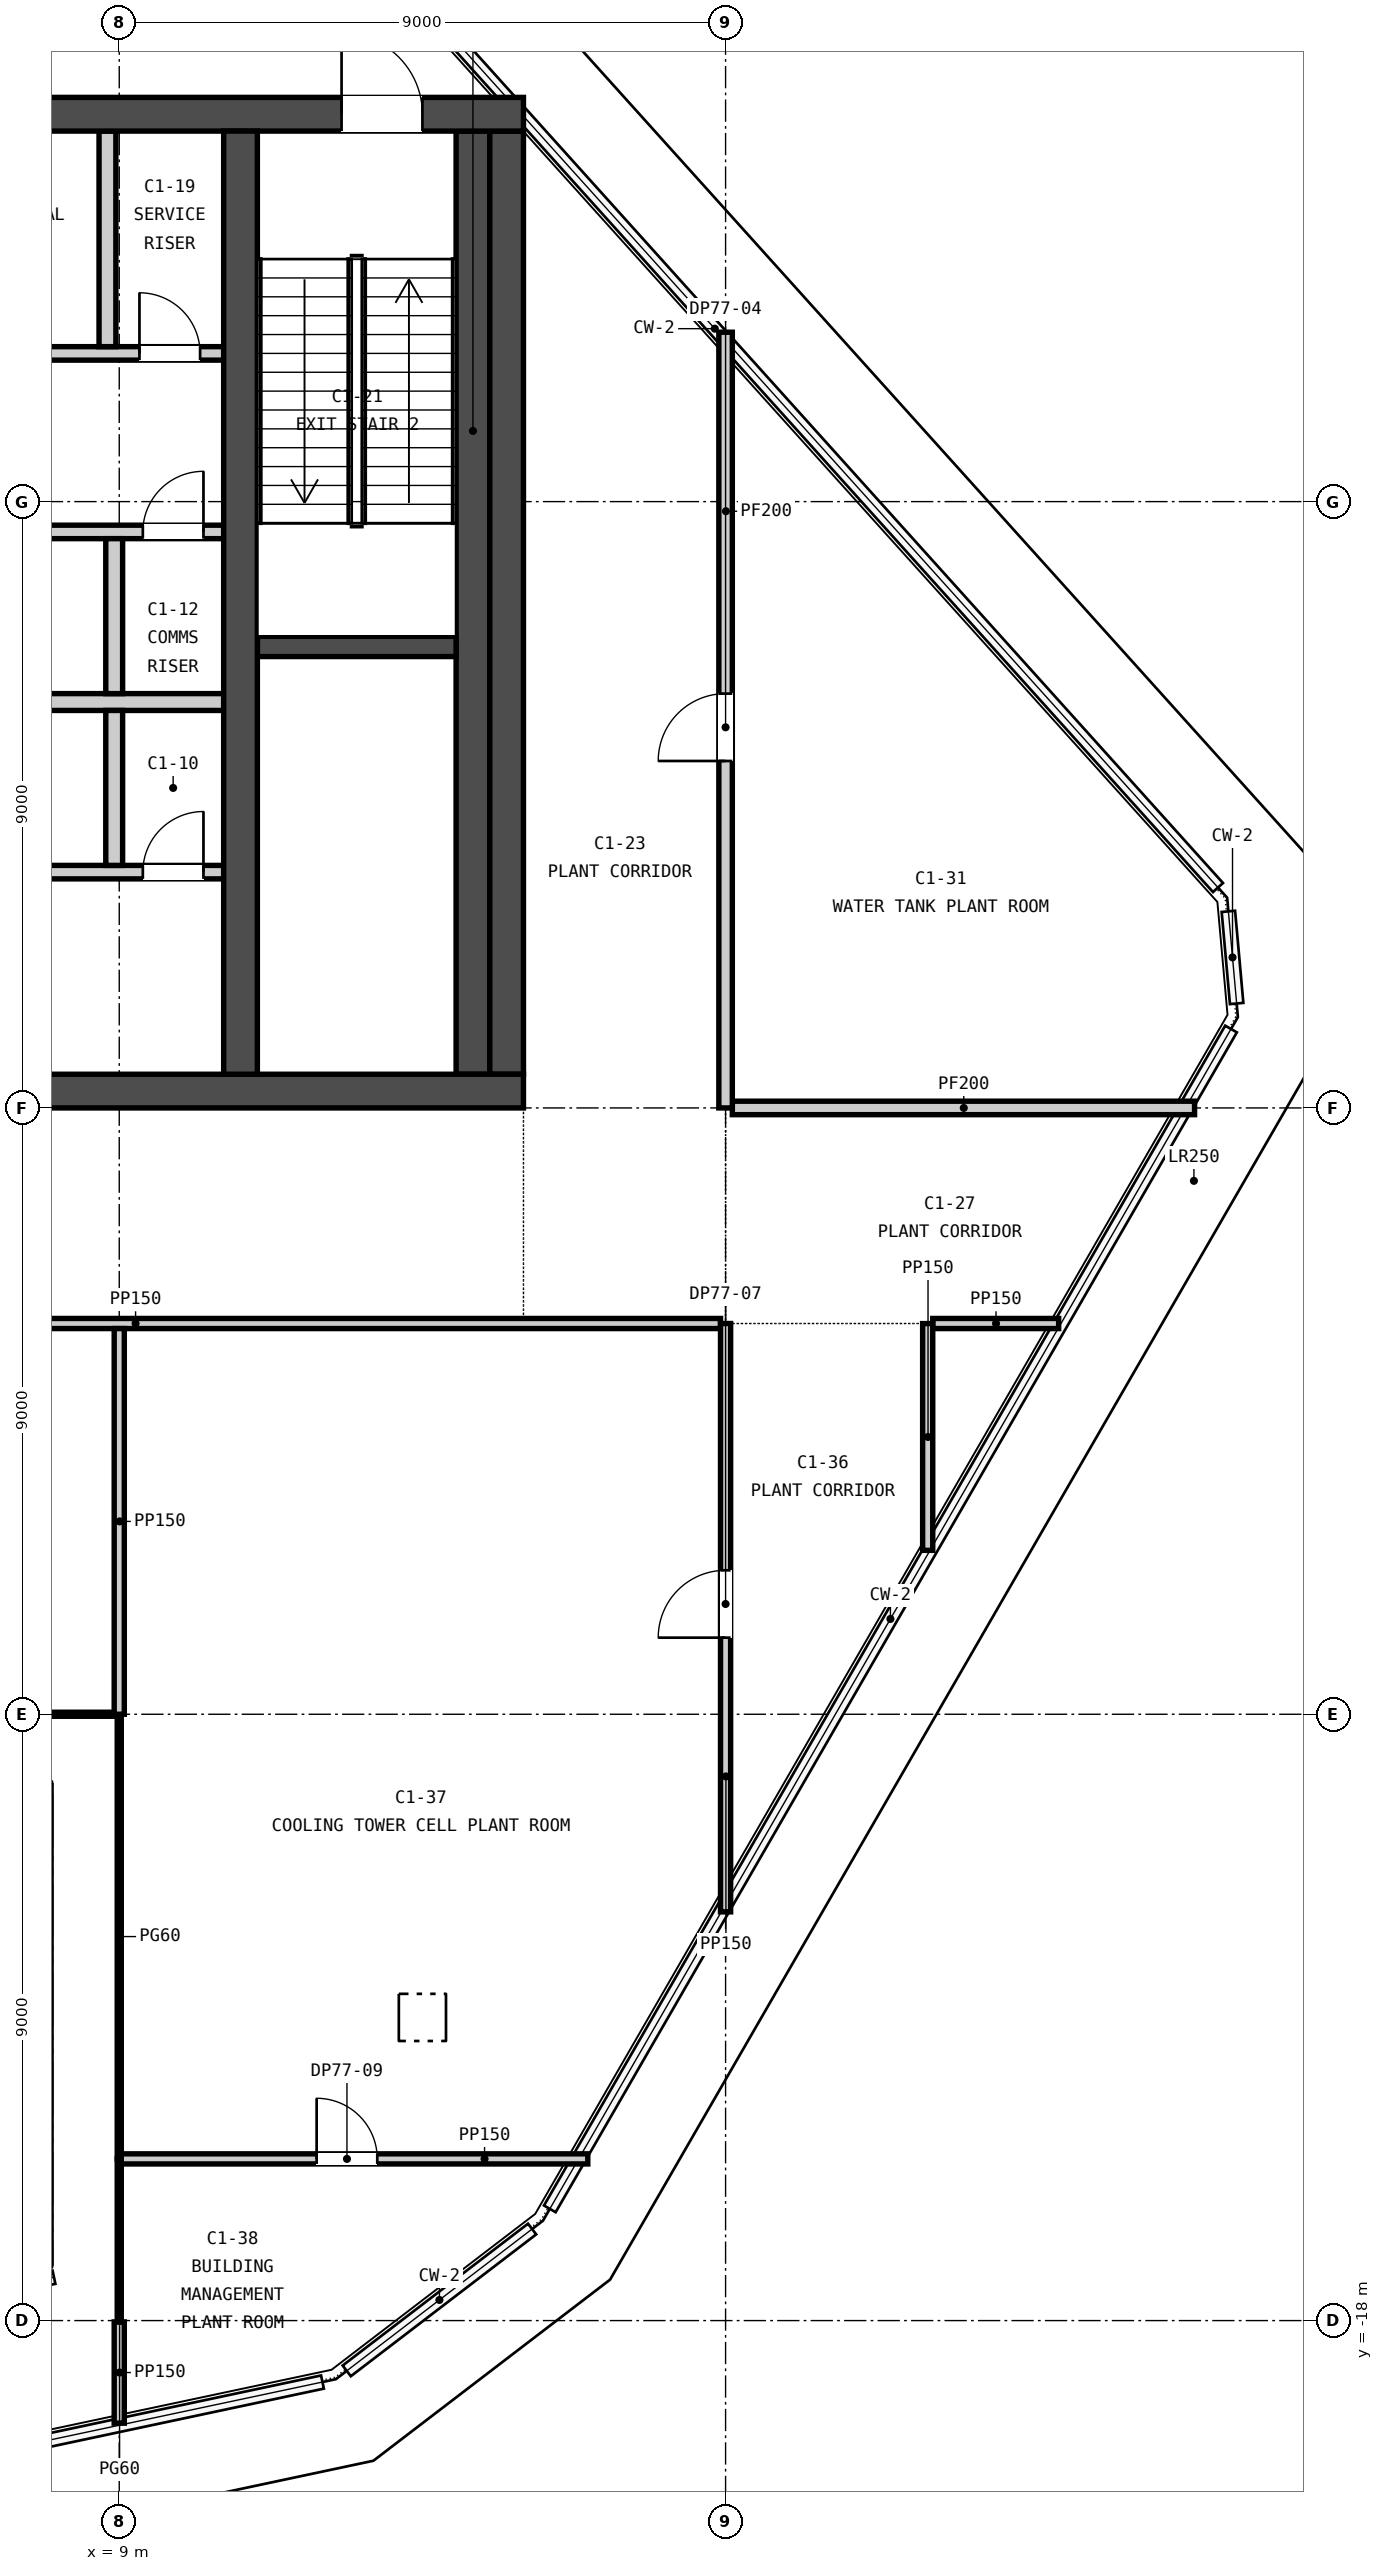
"""IFC4 building model, lengths in metres.
Left out: names, types, materials, properties, quantities, classifications, styles, units other than length and angle.
Written with IfcOpenShell. Run it as: python <this file> out.ifc"""

import sys

from ifc_helpers import new_model, si_unit, direction, frame, frame_2d, origin, place, context, subcontext, project, spatial, rectangle, extrude, element, fill, save


model = new_model("IFC4")
c1 = context("Model", 3, precision=1e-05, world=origin(), true_north=direction((0.0, 1.0)))
c2 = subcontext(c1, "Body", "Model", "MODEL_VIEW")
j1 = project(units=[si_unit("LENGTHUNIT", "METRE"), si_unit("PLANEANGLEUNIT", "RADIAN")], contexts=[c1])
p1 = place(None, origin())
s1 = spatial("IfcSite", under=j1, at=p1, CompositionType="ELEMENT")
p2 = place(p1, origin())
s2 = spatial("IfcBuilding", under=s1, at=p2, CompositionType="ELEMENT")
p3 = place(p2, frame((0.0, 0.0, 301.1)))
s3 = spatial("IfcBuildingStorey", under=s2, at=p3, CompositionType="ELEMENT", Elevation=301.1)
p4 = place(p3, frame((-15.0, 0.25, -0.25), z_axis=(0.0, 0.0, 1.0), x_axis=(1.0, 0.0, 0.0)))
e1 = element("IfcWall", 1, at=p4, inside=s3, PredefinedType="SOLIDWALL", context=c2, shape_type="SweptSolid", body=[
    extrude(rectangle(XDim=30.0, YDim=0.5, at=frame_2d((15.0, 0.0))), origin(), (0.0, 0.0, 1.0), 5.0),
])
p5 = place(p3, frame((-15.0, 14.75, -0.25), z_axis=(0.0, 0.0, 1.0), x_axis=(1.0, 0.0, 0.0)))
e2 = element("IfcWall", 2, at=p5, inside=s3, PredefinedType="SOLIDWALL", context=c2, shape_type="SweptSolid", body=[
    extrude(rectangle(XDim=30.0, YDim=0.5, at=frame_2d((15.0, 0.0))), origin(), (0.0, 0.0, 1.0), 5.0),
])
p6 = place(p5, frame((9.25, 0.0, 0.25)))
e3 = element("IfcOpeningElement", 3, at=p6, cuts=e2, PredefinedType="OPENING", context=c2, shape_type="SweptSolid", body=[
    extrude(rectangle(XDim=1.5, YDim=2.1, at=frame_2d((0.75, 1.05))), frame((0.0, 0.26, 0.0), z_axis=(0.0, -1.0, 0.0), x_axis=(1.0, 0.0, 0.0)), (0.0, 0.0, 1.0), 0.52),
])
p7 = place(p5, frame((19.4, 0.0, 0.25)))
e4 = element("IfcOpeningElement", 4, at=p7, cuts=e2, PredefinedType="OPENING", context=c2, shape_type="SweptSolid", body=[
    extrude(rectangle(XDim=1.5, YDim=2.1, at=frame_2d((0.75, 1.05))), frame((0.0, 0.26, 0.0), z_axis=(0.0, -1.0, 0.0), x_axis=(1.0, 0.0, 0.0)), (0.0, 0.0, 1.0), 0.52),
])
p8 = place(p5, frame((1.5, 0.0, 0.25)))
e5 = element("IfcOpeningElement", 5, at=p8, cuts=e2, PredefinedType="OPENING", context=c2, shape_type="SweptSolid", body=[
    extrude(rectangle(XDim=1.2, YDim=2.1, at=frame_2d((0.6, 1.05))), frame((0.0, 0.26, 0.0), z_axis=(0.0, -1.0, 0.0), x_axis=(1.0, 0.0, 0.0)), (0.0, 0.0, 1.0), 0.52),
])
p9 = place(p5, frame((27.3, 0.0, 0.25)))
e6 = element("IfcOpeningElement", 6, at=p9, cuts=e2, PredefinedType="OPENING", context=c2, shape_type="SweptSolid", body=[
    extrude(rectangle(XDim=1.2, YDim=2.1, at=frame_2d((0.6, 1.05))), frame((0.0, 0.26, 0.0), z_axis=(0.0, -1.0, 0.0), x_axis=(1.0, 0.0, 0.0)), (0.0, 0.0, 1.0), 0.52),
])
for number, where, z_axis, x_axis in (
    (7, (14.75, 0.5, -0.25), (0.0, 0.0, 1.0), (0.0, 1.0, 0.0)),
    (8, (10.8, 0.5, -0.25), (0.0, 0.0, 1.0), (0.0, 1.0, 0.0)),
):
    element("IfcWall", number, at=place(p3, frame(where, z_axis=z_axis, x_axis=x_axis)), inside=s3, PredefinedType="SOLIDWALL", context=c2, shape_type="SweptSolid", body=[
        extrude(rectangle(XDim=14.0, YDim=0.5, at=frame_2d((7.0, 0.0))), origin(), (0.0, 0.0, 1.0), 5.0),
    ])
p10 = place(p3, frame((-10.55, 3.5, 0.0), z_axis=(0.0, 0.0, 1.0), x_axis=(1.0, 0.0, 0.0)))
e9 = element("IfcWall", 9, at=p10, inside=s3, PredefinedType="PARTITIONING", context=c2, shape_type="SweptSolid", body=[
    extrude(rectangle(XDim=21.1, YDim=0.2, at=frame_2d((10.55, 0.0))), origin(), (0.0, 0.0, 1.0), 4.75),
])
p11 = place(p10, frame((19.9, 0.0, 0.0)))
e10 = element("IfcOpeningElement", 10, at=p11, cuts=e9, PredefinedType="OPENING", context=c2, shape_type="SweptSolid", body=[
    extrude(rectangle(XDim=0.9, YDim=2.1, at=frame_2d((0.45, 1.05))), frame((0.0, 0.11, 0.0), z_axis=(0.0, -1.0, 0.0), x_axis=(1.0, 0.0, 0.0)), (0.0, 0.0, 1.0), 0.22),
])
p12 = place(p3, frame((-10.55, 6.025, 0.0), z_axis=(0.0, 0.0, 1.0), x_axis=(1.0, 0.0, 0.0)))
e11 = element("IfcWall", 11, at=p12, inside=s3, PredefinedType="PARTITIONING", context=c2, shape_type="SweptSolid", body=[
    extrude(rectangle(XDim=21.1, YDim=0.25, at=frame_2d((10.55, 0.0))), origin(), (0.0, 0.0, 1.0), 4.75),
])
p13 = place(p3, frame((-4.125, 8.55, 0.0), z_axis=(0.0, 0.0, 1.0), x_axis=(1.0, 0.0, 0.0)))
e12 = element("IfcWall", 12, at=p13, inside=s3, PredefinedType="PARTITIONING", context=c2, shape_type="SweptSolid", body=[
    extrude(rectangle(XDim=14.675, YDim=0.2, at=frame_2d((7.337, 0.0))), origin(), (0.0, 0.0, 1.0), 4.75),
])
p14 = place(p13, frame((3.525, 0.0, 0.0)))
e13 = element("IfcOpeningElement", 13, at=p14, cuts=e12, PredefinedType="OPENING", context=c2, shape_type="SweptSolid", body=[
    extrude(rectangle(XDim=1.2, YDim=2.1, at=frame_2d((0.6, 1.05))), frame((0.0, 0.11, 0.0), z_axis=(0.0, -1.0, 0.0), x_axis=(1.0, 0.0, 0.0)), (0.0, 0.0, 1.0), 0.22),
])
p15 = place(p13, frame((13.475, 0.0, 0.0)))
e14 = element("IfcOpeningElement", 14, at=p15, cuts=e12, PredefinedType="OPENING", context=c2, shape_type="SweptSolid", body=[
    extrude(rectangle(XDim=0.9, YDim=2.1, at=frame_2d((0.45, 1.05))), frame((0.0, 0.11, 0.0), z_axis=(0.0, -1.0, 0.0), x_axis=(1.0, 0.0, 0.0)), (0.0, 0.0, 1.0), 0.22),
])
p16 = place(p3, frame((5.9, 11.2, 0.0), z_axis=(0.0, 0.0, 1.0), x_axis=(1.0, 0.0, 0.0)))
e15 = element("IfcWall", 15, at=p16, inside=s3, PredefinedType="PARTITIONING", context=c2, shape_type="SweptSolid", body=[
    extrude(rectangle(XDim=4.65, YDim=0.2, at=frame_2d((2.325, 0.0))), origin(), (0.0, 0.0, 1.0), 4.75),
])
p17 = place(p16, frame((1.075, 0.0, 0.0)))
e16 = element("IfcOpeningElement", 16, at=p17, cuts=e15, PredefinedType="OPENING", context=c2, shape_type="SweptSolid", body=[
    extrude(rectangle(XDim=0.9, YDim=2.1, at=frame_2d((0.45, 1.05))), frame((0.0, 0.11, 0.0), z_axis=(0.0, -1.0, 0.0), x_axis=(1.0, 0.0, 0.0)), (0.0, 0.0, 1.0), 0.22),
])
p18 = place(p16, frame((3.4, 0.0, 0.0)))
e17 = element("IfcOpeningElement", 17, at=p18, cuts=e15, PredefinedType="OPENING", context=c2, shape_type="SweptSolid", body=[
    extrude(rectangle(XDim=0.9, YDim=2.1, at=frame_2d((0.45, 1.05))), frame((0.0, 0.11, 0.0), z_axis=(0.0, -1.0, 0.0), x_axis=(1.0, 0.0, 0.0)), (0.0, 0.0, 1.0), 0.22),
])
p19 = place(p3, frame((8.925, 3.6, 0.0), z_axis=(0.0, 0.0, 1.0), x_axis=(0.0, 1.0, 0.0)))
e18 = element("IfcWall", 18, at=p19, inside=s3, PredefinedType="PARTITIONING", context=c2, shape_type="SweptSolid", body=[
    extrude(rectangle(XDim=2.3, YDim=0.25, at=frame_2d((1.15, 0.0))), origin(), (0.0, 0.0, 1.0), 4.75),
])
p20 = place(p3, frame((8.925, 6.15, 0.0), z_axis=(0.0, 0.0, 1.0), x_axis=(0.0, 1.0, 0.0)))
e19 = element("IfcWall", 19, at=p20, inside=s3, PredefinedType="PARTITIONING", context=c2, shape_type="SweptSolid", body=[
    extrude(rectangle(XDim=2.3, YDim=0.25, at=frame_2d((1.15, 0.0))), origin(), (0.0, 0.0, 1.0), 4.75),
])
p21 = place(p3, frame((8.825, 11.3, 0.0), z_axis=(0.0, 0.0, 1.0), x_axis=(0.0, 1.0, 0.0)))
e20 = element("IfcWall", 20, at=p21, inside=s3, PredefinedType="PARTITIONING", context=c2, shape_type="SweptSolid", body=[
    extrude(rectangle(XDim=3.2, YDim=0.25, at=frame_2d((1.6, 0.0))), origin(), (0.0, 0.0, 1.0), 4.75),
])
p22 = place(p3, frame((11.05, 6.85, 0.0), z_axis=(0.0, 0.0, 1.0), x_axis=(1.0, 0.0, 0.0)))
e21 = element("IfcWall", 21, at=p22, inside=s3, PredefinedType="SOLIDWALL", context=c2, shape_type="SweptSolid", body=[
    extrude(rectangle(XDim=2.95, YDim=0.3, at=frame_2d((1.475, 0.0))), origin(), (0.0, 0.0, 1.0), 4.75),
])
p23 = place(p3, frame((14.25, 0.5, 0.0), z_axis=(0.0, 0.0, 1.0), x_axis=(0.0, 1.0, 0.0)))
e22 = element("IfcWall", 22, at=p23, inside=s3, PredefinedType="SOLIDWALL", context=c2, shape_type="SweptSolid", body=[
    extrude(rectangle(XDim=14.0, YDim=0.5, at=frame_2d((7.0, 0.0))), origin(), (0.0, 0.0, 1.0), 4.75),
])
p24 = place(p3, frame((9.03, -15.6, 0.0), z_axis=(0.0, 0.0, 1.0), x_axis=(1.0, 0.0, 0.0)))
e23 = element("IfcWall", 23, at=p24, inside=s3, PredefinedType="PARTITIONING", context=c2, shape_type="SweptSolid", body=[
    extrude(rectangle(XDim=6.925, YDim=0.15, at=frame_2d((3.462, 0.0))), origin(), (0.0, 0.0, 1.0), 4.75),
])
p25 = place(p24, frame((2.9, 0.0, 0.0)))
e24 = element("IfcOpeningElement", 24, at=p25, cuts=e23, PredefinedType="OPENING", context=c2, shape_type="SweptSolid", body=[
    extrude(rectangle(XDim=0.9, YDim=2.1, at=frame_2d((0.45, 1.05))), frame((0.0, 0.085, 0.0), z_axis=(0.0, -1.0, 0.0), x_axis=(1.0, 0.0, 0.0)), (0.0, 0.0, 1.0), 0.17),
])
p26 = place(p3, frame((-8.9, -9.0, 0.0), z_axis=(0.0, 0.0, 1.0), x_axis=(1.0, 0.0, 0.0)))
e25 = element("IfcWall", 25, at=p26, inside=s3, PredefinedType="PARTITIONING", context=c2, shape_type="SweptSolid", body=[
    extrude(rectangle(XDim=17.825, YDim=0.06, at=frame_2d((8.913, 0.0))), origin(), (0.0, 0.0, 1.0), 4.75),
])
p27 = place(p3, frame((-8.9, -3.2, 0.0), z_axis=(0.0, 0.0, 1.0), x_axis=(1.0, 0.0, 0.0)))
e26 = element("IfcWall", 26, at=p27, inside=s3, PredefinedType="PARTITIONING", context=c2, shape_type="SweptSolid", body=[
    extrude(rectangle(XDim=26.825, YDim=0.15, at=frame_2d((13.413, 0.0))), origin(), (0.0, 0.0, 1.0), 4.75),
])
p28 = place(p27, frame((8.4, 0.0, 0.0)))
e27 = element("IfcOpeningElement", 27, at=p28, cuts=e26, PredefinedType="OPENING", context=c2, shape_type="SweptSolid", body=[
    extrude(rectangle(XDim=1.0, YDim=2.1, at=frame_2d((0.5, 1.05))), frame((0.0, 0.085, 0.0), z_axis=(0.0, -1.0, 0.0), x_axis=(1.0, 0.0, 0.0)), (0.0, 0.0, 1.0), 0.17),
])
p29 = place(p3, frame((21.075, -3.2, 0.0), z_axis=(0.0, 0.0, 1.0), x_axis=(1.0, 0.0, 0.0)))
e28 = element("IfcWall", 28, at=p29, inside=s3, PredefinedType="PARTITIONING", context=c2, shape_type="SweptSolid", body=[
    extrude(rectangle(XDim=1.869, YDim=0.15, at=frame_2d((0.935, 0.0))), origin(), (0.0, 0.0, 1.0), 4.75),
])
p30 = place(p3, frame((18.1, 0.0, 0.0), z_axis=(0.0, 0.0, 1.0), x_axis=(1.0, 0.0, 0.0)))
e29 = element("IfcWall", 29, at=p30, inside=s3, PredefinedType="PARTITIONING", context=c2, shape_type="SweptSolid", body=[
    extrude(rectangle(XDim=6.861, YDim=0.2, at=frame_2d((3.431, 0.0))), origin(), (0.0, 0.0, 1.0), 4.75),
])
p31 = place(p3, frame((9.0, -19.523, 0.0), z_axis=(0.0, 0.0, 1.0), x_axis=(0.0, 1.0, 0.0)))
e30 = element("IfcWall", 30, at=p31, inside=s3, PredefinedType="PARTITIONING", context=c2, shape_type="SweptSolid", body=[
    extrude(rectangle(XDim=1.503, YDim=0.15, at=frame_2d((0.751, 0.0))), origin(), (0.0, 0.0, 1.0), 4.75),
])
p32 = place(p3, frame((9.0, -18.02, 0.0), z_axis=(0.0, 0.0, 1.0), x_axis=(0.0, 1.0, 0.0)))
e31 = element("IfcWall", 31, at=p32, inside=s3, PredefinedType="PARTITIONING", context=c2, shape_type="SweptSolid", body=[
    extrude(rectangle(XDim=2.419, YDim=0.06, at=frame_2d((1.209, 0.0))), origin(), (0.0, 0.0, 1.0), 4.75),
])
p33 = place(p3, frame((9.0, -15.599, 0.0), z_axis=(0.0, 0.0, 1.0), x_axis=(0.0, 1.0, 0.0)))
e32 = element("IfcWall", 32, at=p33, inside=s3, PredefinedType="PARTITIONING", context=c2, shape_type="SweptSolid", body=[
    extrude(rectangle(XDim=6.598, YDim=0.06, at=frame_2d((3.299, 0.0))), origin(), (0.0, 0.0, 1.0), 4.75),
])
p34 = place(p3, frame((9.0, -9.0, 0.0), z_axis=(0.0, 0.0, 1.0), x_axis=(0.0, 1.0, 0.0)))
e33 = element("IfcWall", 33, at=p34, inside=s3, PredefinedType="PARTITIONING", context=c2, shape_type="SweptSolid", body=[
    extrude(rectangle(XDim=5.725, YDim=0.15, at=frame_2d((2.863, 0.0))), origin(), (0.0, 0.0, 1.0), 4.75),
])
p35 = place(p3, frame((18.0, -11.933, 0.0), z_axis=(0.0, 0.0, 1.0), x_axis=(0.0, 1.0, 0.0)))
e34 = element("IfcWall", 34, at=p35, inside=s3, PredefinedType="PARTITIONING", context=c2, shape_type="SweptSolid", body=[
    extrude(rectangle(XDim=8.733, YDim=0.15, at=frame_2d((4.367, 0.0))), origin(), (0.0, 0.0, 1.0), 4.75),
])
p36 = place(p35, frame((4.07, 0.0, 0.0)))
e35 = element("IfcOpeningElement", 35, at=p36, cuts=e34, PredefinedType="OPENING", context=c2, shape_type="SweptSolid", body=[
    extrude(rectangle(XDim=1.0, YDim=2.1, at=frame_2d((0.5, 1.05))), frame((0.0, 0.085, 0.0), z_axis=(0.0, -1.0, 0.0), x_axis=(1.0, 0.0, 0.0)), (0.0, 0.0, 1.0), 0.17),
])
p37 = place(p3, frame((18.0, 0.0, 0.0), z_axis=(0.0, 0.0, 1.0), x_axis=(0.0, 1.0, 0.0)))
e36 = element("IfcWall", 36, at=p37, inside=s3, PredefinedType="PARTITIONING", context=c2, shape_type="SweptSolid", body=[
    extrude(rectangle(XDim=11.514, YDim=0.2, at=frame_2d((5.757, 0.0))), origin(), (0.0, 0.0, 1.0), 4.75),
])
p38 = place(p37, frame((5.15, 0.0, 0.0)))
e37 = element("IfcOpeningElement", 37, at=p38, cuts=e36, PredefinedType="OPENING", context=c2, shape_type="SweptSolid", body=[
    extrude(rectangle(XDim=1.0, YDim=2.1, at=frame_2d((0.5, 1.05))), frame((0.0, 0.11, 0.0), z_axis=(0.0, -1.0, 0.0), x_axis=(1.0, 0.0, 0.0)), (0.0, 0.0, 1.0), 0.22),
])
p39 = place(p3, frame((21.0, -6.567, 0.0), z_axis=(0.0, 0.0, 1.0), x_axis=(0.0, 1.0, 0.0)))
e38 = element("IfcWall", 38, at=p39, inside=s3, PredefinedType="PARTITIONING", context=c2, shape_type="SweptSolid", body=[
    extrude(rectangle(XDim=3.366, YDim=0.15, at=frame_2d((1.683, 0.0))), origin(), (0.0, 0.0, 1.0), 4.75),
])
p40 = place(p11, origin())
e39 = element("IfcDoor", 39, at=p40, inside=s3, OperationType="SINGLE_SWING_RIGHT", PredefinedType="DOOR", context=c2, shape_type="SweptSolid", body=[
    extrude(rectangle(XDim=0.9, YDim=2.1, at=frame_2d((0.45, 1.05))), frame((0.0, 0.025, 0.0), z_axis=(0.0, -1.0, 0.0), x_axis=(1.0, 0.0, 0.0)), (0.0, 0.0, 1.0), 0.05),
])
fill(e10, e39)
p41 = place(p15, origin())
e40 = element("IfcDoor", 40, at=p41, inside=s3, OperationType="SINGLE_SWING_RIGHT", PredefinedType="DOOR", context=c2, shape_type="SweptSolid", body=[
    extrude(rectangle(XDim=0.9, YDim=2.1, at=frame_2d((0.45, 1.05))), frame((0.0, 0.025, 0.0), z_axis=(0.0, -1.0, 0.0), x_axis=(1.0, 0.0, 0.0)), (0.0, 0.0, 1.0), 0.05),
])
fill(e14, e40)
p42 = place(p18, origin())
e41 = element("IfcDoor", 41, at=p42, inside=s3, OperationType="SINGLE_SWING_LEFT", PredefinedType="DOOR", context=c2, shape_type="SweptSolid", body=[
    extrude(rectangle(XDim=0.9, YDim=2.1, at=frame_2d((0.45, 1.05))), frame((0.0, 0.025, 0.0), z_axis=(0.0, -1.0, 0.0), x_axis=(1.0, 0.0, 0.0)), (0.0, 0.0, 1.0), 0.05),
])
fill(e17, e41)
p43 = place(p9, origin())
e42 = element("IfcDoor", 42, at=p43, inside=s3, OperationType="SINGLE_SWING_LEFT", PredefinedType="DOOR", context=c2, shape_type="SweptSolid", body=[
    extrude(rectangle(XDim=1.2, YDim=2.1, at=frame_2d((0.6, 1.05))), frame((0.0, 0.025, 0.0), z_axis=(0.0, -1.0, 0.0), x_axis=(1.0, 0.0, 0.0)), (0.0, 0.0, 1.0), 0.05),
])
fill(e6, e42)
p44 = place(p38, origin())
e43 = element("IfcDoor", 43, at=p44, inside=s3, OperationType="SINGLE_SWING_LEFT", PredefinedType="DOOR", context=c2, shape_type="SweptSolid", body=[
    extrude(rectangle(XDim=1.0, YDim=2.1, at=frame_2d((0.5, 1.05))), frame((0.0, 0.025, 0.0), z_axis=(0.0, -1.0, 0.0), x_axis=(1.0, 0.0, 0.0)), (0.0, 0.0, 1.0), 0.05),
])
fill(e37, e43)
p45 = place(p36, origin())
e44 = element("IfcDoor", 44, at=p45, inside=s3, OperationType="SINGLE_SWING_LEFT", PredefinedType="DOOR", context=c2, shape_type="SweptSolid", body=[
    extrude(rectangle(XDim=1.0, YDim=2.1, at=frame_2d((0.5, 1.05))), frame((0.0, 0.025, 0.0), z_axis=(0.0, -1.0, 0.0), x_axis=(1.0, 0.0, 0.0)), (0.0, 0.0, 1.0), 0.05),
])
fill(e35, e44)
p46 = place(p25, origin())
e45 = element("IfcDoor", 45, at=p46, inside=s3, OperationType="SINGLE_SWING_LEFT", PredefinedType="DOOR", context=c2, shape_type="SweptSolid", body=[
    extrude(rectangle(XDim=0.9, YDim=2.1, at=frame_2d((0.45, 1.05))), frame((0.0, 0.025, 0.0), z_axis=(0.0, -1.0, 0.0), x_axis=(1.0, 0.0, 0.0)), (0.0, 0.0, 1.0), 0.05),
])
fill(e24, e45)
save(model, sys.argv[1])
